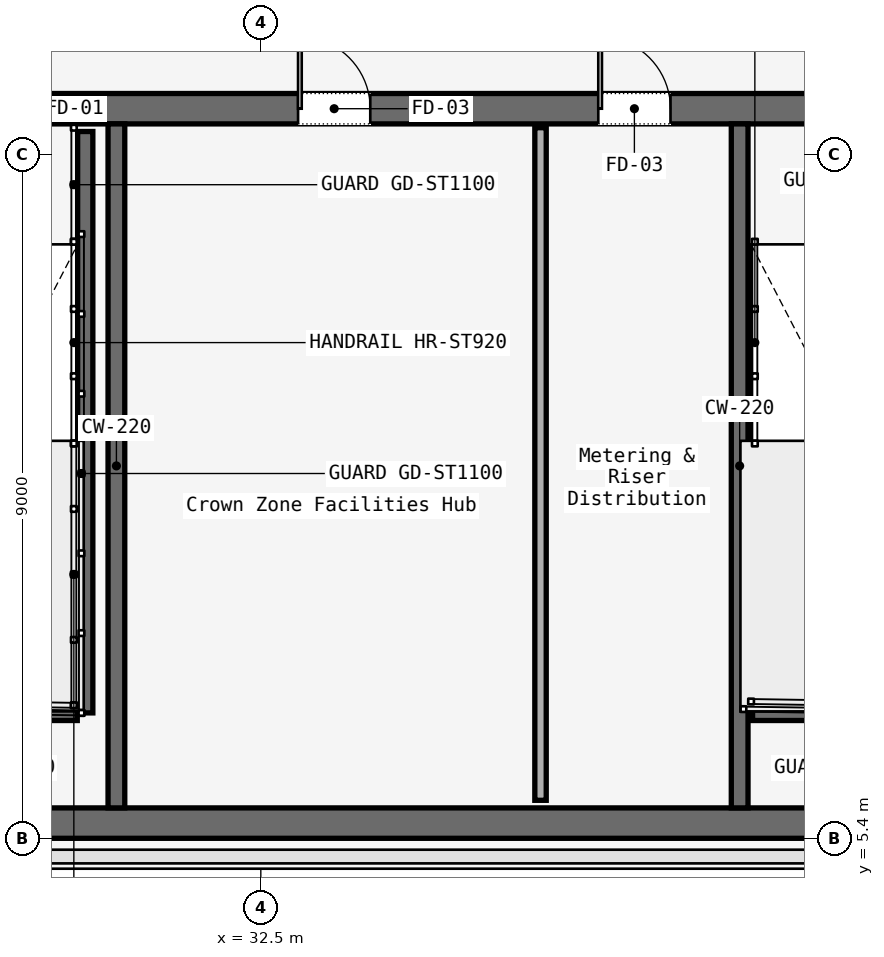
"""IFC4 building model, lengths in metres.
Left out: names, types, materials, properties, quantities, classifications, styles, units other than length and angle.
Written with IfcOpenShell. Run it as: python <this file> out.ifc"""

import sys

from ifc_helpers import new_model, si_unit, direction, frame, frame_2d, origin, place, context, subcontext, project, spatial, rectangle, extrude, element, fill, save


model = new_model("IFC4")
c1 = context("Model", 3, precision=1e-05, world=origin(), true_north=direction((0.0, 1.0)))
c2 = subcontext(c1, "Body", "Model", "MODEL_VIEW")
j1 = project(units=[si_unit("LENGTHUNIT", "METRE"), si_unit("PLANEANGLEUNIT", "RADIAN")], contexts=[c1])
p1 = place(None, origin())
s1 = spatial("IfcSite", under=j1, at=p1, CompositionType="ELEMENT")
p2 = place(p1, origin())
s2 = spatial("IfcBuilding", under=s1, at=p2, CompositionType="ELEMENT")
p3 = place(p2, frame((0.0, 0.0, 237.0)))
s3 = spatial("IfcBuildingStorey", under=s2, at=p3, CompositionType="ELEMENT", Elevation=237.0)
p4 = place(p3, frame((26.45, 15.0, 0.0), z_axis=(0.0, 0.0, 1.0), x_axis=(1.0, 0.0, 0.0)))
e1 = element("IfcWall", 1, at=p4, inside=s3, PredefinedType="SOLIDWALL", context=c2, shape_type="SweptSolid", body=[
    extrude(rectangle(XDim=31.1, YDim=0.4, at=frame_2d((15.55, 0.0))), origin(), (0.0, 0.0, 1.0), 3.58),
])
p5 = place(p4, frame((1.65, 0.0, 0.0)))
e2 = element("IfcOpeningElement", 2, at=p5, cuts=e1, PredefinedType="OPENING", context=c2, shape_type="SweptSolid", body=[
    extrude(rectangle(XDim=1.1, YDim=2.2, at=frame_2d((0.55, 1.1))), frame((0.0, 0.2, 0.0), z_axis=(0.0, -1.0, 0.0), x_axis=(1.0, 0.0, 0.0)), (0.0, 0.0, 1.0), 0.4),
])
p6 = place(p4, frame((13.65, 0.0, 0.0)))
e3 = element("IfcOpeningElement", 3, at=p6, cuts=e1, PredefinedType="OPENING", context=c2, shape_type="SweptSolid", body=[
    extrude(rectangle(XDim=1.1, YDim=2.2, at=frame_2d((0.55, 1.1))), frame((0.0, 0.2, 0.0), z_axis=(0.0, -1.0, 0.0), x_axis=(1.0, 0.0, 0.0)), (0.0, 0.0, 1.0), 0.4),
])
p7 = place(p4, frame((25.55, 0.0, 0.0)))
e4 = element("IfcOpeningElement", 4, at=p7, cuts=e1, PredefinedType="OPENING", context=c2, shape_type="SweptSolid", body=[
    extrude(rectangle(XDim=1.1, YDim=2.2, at=frame_2d((0.55, 1.1))), frame((0.0, 0.2, 0.0), z_axis=(0.0, -1.0, 0.0), x_axis=(1.0, 0.0, 0.0)), (0.0, 0.0, 1.0), 0.4),
])
p8 = place(p4, frame((19.35, 0.0, 0.0)))
e5 = element("IfcOpeningElement", 5, at=p8, cuts=e1, PredefinedType="OPENING", context=c2, shape_type="SweptSolid", body=[
    extrude(rectangle(XDim=1.1, YDim=2.2, at=frame_2d((0.55, 1.1))), frame((0.0, 0.2, 0.0), z_axis=(0.0, -1.0, 0.0), x_axis=(1.0, 0.0, 0.0)), (0.0, 0.0, 1.0), 0.4),
])
p9 = place(p4, frame((21.4, 0.0, 0.0)))
e6 = element("IfcOpeningElement", 6, at=p9, cuts=e1, PredefinedType="OPENING", context=c2, shape_type="SweptSolid", body=[
    extrude(rectangle(XDim=0.9, YDim=2.1, at=frame_2d((0.45, 1.05))), frame((0.0, 0.2, 0.0), z_axis=(0.0, -1.0, 0.0), x_axis=(1.0, 0.0, 0.0)), (0.0, 0.0, 1.0), 0.4),
])
p10 = place(p4, frame((6.54, 0.0, 0.0)))
e7 = element("IfcOpeningElement", 7, at=p10, cuts=e1, PredefinedType="OPENING", context=c2, shape_type="SweptSolid", body=[
    extrude(rectangle(XDim=0.95, YDim=2.2, at=frame_2d((0.475, 1.1))), frame((0.0, 0.2, 0.0), z_axis=(0.0, -1.0, 0.0), x_axis=(1.0, 0.0, 0.0)), (0.0, 0.0, 1.0), 0.4),
])
p11 = place(p4, frame((10.49, 0.0, 0.0)))
e8 = element("IfcOpeningElement", 8, at=p11, cuts=e1, PredefinedType="OPENING", context=c2, shape_type="SweptSolid", body=[
    extrude(rectangle(XDim=0.95, YDim=2.2, at=frame_2d((0.475, 1.1))), frame((0.0, 0.2, 0.0), z_axis=(0.0, -1.0, 0.0), x_axis=(1.0, 0.0, 0.0)), (0.0, 0.0, 1.0), 0.4),
])
p12 = place(p4, frame((23.35, 0.0, 0.0)))
e9 = element("IfcOpeningElement", 9, at=p12, cuts=e1, PredefinedType="OPENING", context=c2, shape_type="SweptSolid", body=[
    extrude(rectangle(XDim=1.3, YDim=2.3, at=frame_2d((0.65, 1.15))), frame((0.0, 0.2, 0.0), z_axis=(0.0, -1.0, 0.0), x_axis=(1.0, 0.0, 0.0)), (0.0, 0.0, 1.0), 0.4),
])
p13 = place(p3, frame((26.45, 5.6, 0.0), z_axis=(0.0, 0.0, 1.0), x_axis=(1.0, 0.0, 0.0)))
e10 = element("IfcWall", 10, at=p13, inside=s3, PredefinedType="SOLIDWALL", context=c2, shape_type="SweptSolid", body=[
    extrude(rectangle(XDim=31.1, YDim=0.4, at=frame_2d((15.55, 0.0))), origin(), (0.0, 0.0, 1.0), 3.58),
])
for number, where, z_axis, x_axis in (
    (11, (30.6, 5.8, 0.0), (0.0, 0.0, 1.0), (0.0, 1.0, 0.0)),
    (12, (38.8, 5.8, 0.0), (0.0, 0.0, 1.0), (0.0, 1.0, 0.0)),
):
    element("IfcWall", number, at=place(p3, frame(where, z_axis=z_axis, x_axis=x_axis)), inside=s3, PredefinedType="SOLIDWALL", context=c2, shape_type="SweptSolid", body=[
        extrude(rectangle(XDim=9.0, YDim=0.22, at=frame_2d((4.5, 0.0))), origin(), (0.0, 0.0, 1.0), 3.58),
    ])
p14 = place(p3, frame((30.19, 14.7, 0.0), z_axis=(0.0, 0.0, 1.0), x_axis=(0.0, -1.0, 0.0)))
e13 = element("IfcWall", 13, at=p14, inside=s3, PredefinedType="SOLIDWALL", context=c2, shape_type="SweptSolid", body=[
    extrude(rectangle(XDim=7.65, YDim=0.2, at=frame_2d((3.825, 0.0))), origin(), (0.0, 0.0, 1.0), 3.8),
])
for number, where, z_axis, x_axis in (
    (14, (26.97, 7.05, 0.0), (0.0, 0.0, 1.0), (1.0, 0.0, 0.0)),
    (15, (38.97, 7.05, 0.0), (0.0, 0.0, 1.0), (1.0, 0.0, 0.0)),
):
    element("IfcWall", number, at=place(p3, frame(where, z_axis=z_axis, x_axis=x_axis)), inside=s3, PredefinedType="SOLIDWALL", context=c2, shape_type="SweptSolid", body=[
        extrude(rectangle(XDim=3.115, YDim=0.2, at=frame_2d((1.558, 0.0))), origin(), (0.0, 0.0, 1.0), 3.8),
    ])
p15 = place(p3, frame((36.18, 5.9, 0.0), z_axis=(0.0, 0.0, 1.0), x_axis=(0.0, 1.0, 0.0)))
e16 = element("IfcWall", 16, at=p15, inside=s3, PredefinedType="PARTITIONING", context=c2, shape_type="SweptSolid", body=[
    extrude(rectangle(XDim=8.85, YDim=0.15, at=frame_2d((4.425, 0.0))), origin(), (0.0, 0.0, 1.0), 3.01),
])
p16 = place(p10, origin())
e17 = element("IfcDoor", 17, at=p16, inside=s3, OperationType="SINGLE_SWING_LEFT", PredefinedType="DOOR", context=c2, shape_type="SweptSolid", body=[
    extrude(rectangle(XDim=0.95, YDim=2.2, at=frame_2d((0.475, 1.1))), frame((0.0, 0.025, 0.0), z_axis=(0.0, -1.0, 0.0), x_axis=(1.0, 0.0, 0.0)), (0.0, 0.0, 1.0), 0.05),
])
fill(e7, e17)
p17 = place(p11, origin())
e18 = element("IfcDoor", 18, at=p17, inside=s3, OperationType="SINGLE_SWING_RIGHT", PredefinedType="DOOR", context=c2, shape_type="SweptSolid", body=[
    extrude(rectangle(XDim=0.95, YDim=2.2, at=frame_2d((0.475, 1.1))), frame((0.0, 0.025, 0.0), z_axis=(0.0, -1.0, 0.0), x_axis=(1.0, 0.0, 0.0)), (0.0, 0.0, 1.0), 0.05),
])
fill(e8, e18)
save(model, sys.argv[1])
